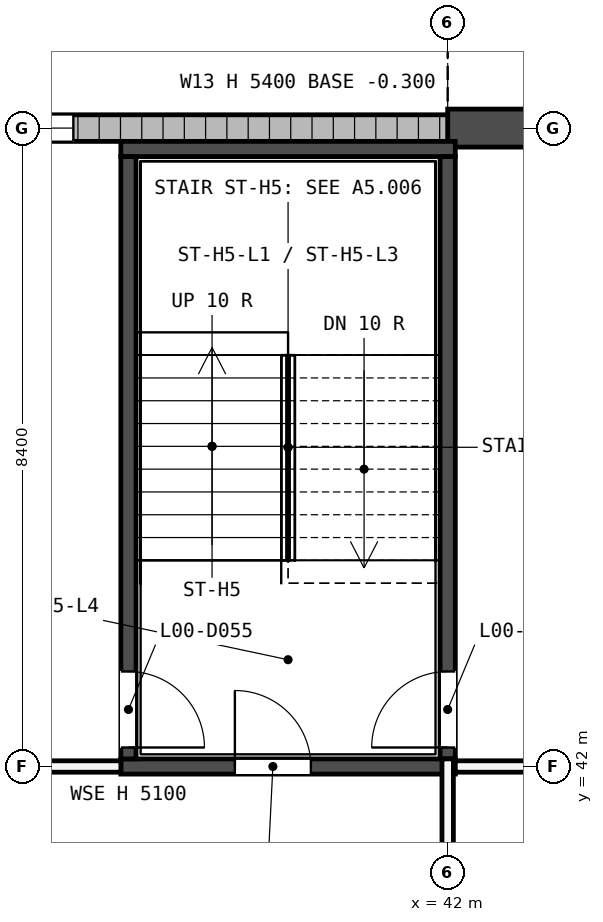
"""IFC4 building model, lengths in metres.
Left out: names, types, materials, properties, quantities, classifications, styles, units other than length and angle.
Written with IfcOpenShell. Run it as: python <this file> out.ifc"""

import sys

from ifc_helpers import new_model, si_unit, direction, frame, frame_2d, origin, place, context, subcontext, project, spatial, rectangle, extrude, element, fill, save


model = new_model("IFC4")
c1 = context("Model", 3, precision=1e-05, world=origin(), true_north=direction((0.0, 1.0)))
c2 = subcontext(c1, "Body", "Model", "MODEL_VIEW")
j1 = project(units=[si_unit("LENGTHUNIT", "METRE"), si_unit("PLANEANGLEUNIT", "RADIAN")], contexts=[c1])
p1 = place(None, origin())
s1 = spatial("IfcSite", under=j1, at=p1, CompositionType="ELEMENT")
p2 = place(p1, origin())
s2 = spatial("IfcBuilding", under=s1, at=p2, CompositionType="ELEMENT")
p3 = place(p2, origin())
s3 = spatial("IfcBuildingStorey", under=s2, at=p3, CompositionType="ELEMENT", Elevation=0.0)
p4 = place(p3, frame((42.0, 50.4, -0.3), z_axis=(0.0, 0.0, 1.0), x_axis=(1.0, 0.0, 0.0)))
e1 = element("IfcWall", 1, at=p4, inside=s3, PredefinedType="SHEAR", context=c2, shape_type="SweptSolid", body=[
    extrude(rectangle(XDim=42.0, YDim=0.5, at=frame_2d((21.0, 0.0))), origin(), (0.0, 0.0, 1.0), 5.4),
])
p5 = place(p4, frame((17.25, 0.0, 0.3)))
e2 = element("IfcOpeningElement", 2, at=p5, cuts=e1, PredefinedType="OPENING", context=c2, shape_type="SweptSolid", body=[
    extrude(rectangle(XDim=3.3, YDim=2.7, at=frame_2d((1.65, 1.35))), frame((0.0, 0.26, 0.0), z_axis=(0.0, -1.0, 0.0), x_axis=(1.0, 0.0, 0.0)), (0.0, 0.0, 1.0), 0.52),
])
p6 = place(p4, frame((21.45, 0.0, 0.3)))
e3 = element("IfcOpeningElement", 3, at=p6, cuts=e1, PredefinedType="OPENING", context=c2, shape_type="SweptSolid", body=[
    extrude(rectangle(XDim=3.3, YDim=2.7, at=frame_2d((1.65, 1.35))), frame((0.0, 0.26, 0.0), z_axis=(0.0, -1.0, 0.0), x_axis=(1.0, 0.0, 0.0)), (0.0, 0.0, 1.0), 0.52),
])
p7 = place(p3, frame((33.95, 50.4, 0.0), z_axis=(0.0, 0.0, 1.0), x_axis=(1.0, 0.0, 0.0)))
e4 = element("IfcWall", 4, at=p7, inside=s3, PredefinedType="STANDARD", context=c2, shape_type="SweptSolid", body=[
    extrude(rectangle(XDim=8.05, YDim=0.35, at=frame_2d((4.025, 0.0))), origin(), (0.0, 0.0, 1.0), 5.1),
])
p8 = place(p7, frame((0.725, 0.0, 0.9)))
e5 = element("IfcOpeningElement", 5, at=p8, cuts=e4, PredefinedType="OPENING", context=c2, shape_type="SweptSolid", body=[
    extrude(rectangle(XDim=2.4, YDim=1.5, at=frame_2d((1.2, 0.75))), frame((0.0, 0.185, 0.0), z_axis=(0.0, -1.0, 0.0), x_axis=(1.0, 0.0, 0.0)), (0.0, 0.0, 1.0), 0.37),
])
p9 = place(p3, frame((37.7, 42.0, 0.0), z_axis=(0.0, 0.0, 1.0), x_axis=(1.0, 0.0, 0.0)))
e6 = element("IfcWall", 6, at=p9, inside=s3, PredefinedType="SHEAR", context=c2, shape_type="SweptSolid", body=[
    extrude(rectangle(XDim=4.4, YDim=0.2, at=frame_2d((2.2, 0.0))), origin(), (0.0, 0.0, 1.0), 5.1),
])
p10 = place(p9, frame((1.5, 0.0, 0.0)))
e7 = element("IfcOpeningElement", 7, at=p10, cuts=e6, PredefinedType="OPENING", context=c2, shape_type="SweptSolid", body=[
    extrude(rectangle(XDim=1.0, YDim=2.1, at=frame_2d((0.5, 1.05))), frame((0.0, 0.11, 0.0), z_axis=(0.0, -1.0, 0.0), x_axis=(1.0, 0.0, 0.0)), (0.0, 0.0, 1.0), 0.22),
])
p11 = place(p3, frame((37.7, 50.125, 0.0), z_axis=(0.0, 0.0, 1.0), x_axis=(1.0, 0.0, 0.0)))
e8 = element("IfcWall", 8, at=p11, inside=s3, PredefinedType="SHEAR", context=c2, shape_type="SweptSolid", body=[
    extrude(rectangle(XDim=4.4, YDim=0.2, at=frame_2d((2.2, 0.0))), origin(), (0.0, 0.0, 1.0), 5.1),
])
p12 = place(p3, frame((37.8, 42.1, 0.0), z_axis=(0.0, 0.0, 1.0), x_axis=(0.0, 1.0, 0.0)))
e9 = element("IfcWall", 9, at=p12, inside=s3, PredefinedType="SHEAR", context=c2, shape_type="SweptSolid", body=[
    extrude(rectangle(XDim=7.925, YDim=0.2, at=frame_2d((3.962, 0.0))), origin(), (0.0, 0.0, 1.0), 5.1),
])
p13 = place(p12, frame((0.15, 0.0, 0.0)))
e10 = element("IfcOpeningElement", 10, at=p13, cuts=e9, PredefinedType="OPENING", context=c2, shape_type="SweptSolid", body=[
    extrude(rectangle(XDim=1.0, YDim=2.1, at=frame_2d((0.5, 1.05))), frame((0.0, 0.11, 0.0), z_axis=(0.0, -1.0, 0.0), x_axis=(1.0, 0.0, 0.0)), (0.0, 0.0, 1.0), 0.22),
])
p14 = place(p3, frame((42.0, 42.1, 0.0), z_axis=(0.0, 0.0, 1.0), x_axis=(0.0, 1.0, 0.0)))
e11 = element("IfcWall", 11, at=p14, inside=s3, PredefinedType="SHEAR", context=c2, shape_type="SweptSolid", body=[
    extrude(rectangle(XDim=7.925, YDim=0.2, at=frame_2d((3.962, 0.0))), origin(), (0.0, 0.0, 1.0), 5.1),
])
p15 = place(p14, frame((0.15, 0.0, 0.0)))
e12 = element("IfcOpeningElement", 12, at=p15, cuts=e11, PredefinedType="OPENING", context=c2, shape_type="SweptSolid", body=[
    extrude(rectangle(XDim=1.0, YDim=2.1, at=frame_2d((0.5, 1.05))), frame((0.0, 0.11, 0.0), z_axis=(0.0, -1.0, 0.0), x_axis=(1.0, 0.0, 0.0)), (0.0, 0.0, 1.0), 0.22),
])
p16 = place(p3, frame((25.2, 42.0, 0.0), z_axis=(0.0, 0.0, 1.0), x_axis=(1.0, 0.0, 0.0)))
e13 = element("IfcWall", 13, at=p16, inside=s3, PredefinedType="PARTITIONING", context=c2, shape_type="SweptSolid", body=[
    extrude(rectangle(XDim=12.5, YDim=0.15, at=frame_2d((6.25, 0.0))), origin(), (0.0, 0.0, 1.0), 5.1),
])
p17 = place(p16, frame((0.6, 0.0, 0.0)))
e14 = element("IfcOpeningElement", 14, at=p17, cuts=e13, PredefinedType="OPENING", context=c2, shape_type="SweptSolid", body=[
    extrude(rectangle(XDim=1.0, YDim=2.1, at=frame_2d((0.5, 1.05))), frame((0.0, 0.085, 0.0), z_axis=(0.0, -1.0, 0.0), x_axis=(1.0, 0.0, 0.0)), (0.0, 0.0, 1.0), 0.17),
])
p18 = place(p16, frame((6.9, 0.0, 0.0)))
e15 = element("IfcOpeningElement", 15, at=p18, cuts=e13, PredefinedType="OPENING", context=c2, shape_type="SweptSolid", body=[
    extrude(rectangle(XDim=1.0, YDim=2.1, at=frame_2d((0.5, 1.05))), frame((0.0, 0.085, 0.0), z_axis=(0.0, -1.0, 0.0), x_axis=(1.0, 0.0, 0.0)), (0.0, 0.0, 1.0), 0.17),
])
p19 = place(p3, frame((42.1, 42.0, 0.0), z_axis=(0.0, 0.0, 1.0), x_axis=(1.0, 0.0, 0.0)))
e16 = element("IfcWall", 16, at=p19, inside=s3, PredefinedType="PARTITIONING", context=c2, shape_type="SweptSolid", body=[
    extrude(rectangle(XDim=8.58, YDim=0.15, at=frame_2d((4.29, 0.0))), origin(), (0.0, 0.0, 1.0), 5.1),
])
p20 = place(p3, frame((42.0, 37.875, 0.0), z_axis=(0.0, 0.0, 1.0), x_axis=(0.0, 1.0, 0.0)))
e17 = element("IfcWall", 17, at=p20, inside=s3, PredefinedType="PARTITIONING", context=c2, shape_type="SweptSolid", body=[
    extrude(rectangle(XDim=4.225, YDim=0.15, at=frame_2d((2.113, 0.0))), origin(), (0.0, 0.0, 1.0), 5.1),
])
p21 = place(p20, frame((1.325, 0.0, 0.0)))
e18 = element("IfcOpeningElement", 18, at=p21, cuts=e17, PredefinedType="OPENING", context=c2, shape_type="SweptSolid", body=[
    extrude(rectangle(XDim=1.0, YDim=2.1, at=frame_2d((0.5, 1.05))), frame((0.0, 0.085, 0.0), z_axis=(0.0, -1.0, 0.0), x_axis=(1.0, 0.0, 0.0)), (0.0, 0.0, 1.0), 0.17),
])
p22 = place(p8, origin())
e19 = element("IfcWindow", 19, at=p22, inside=s3, PartitioningType="SINGLE_PANEL", PredefinedType="WINDOW", context=c2, shape_type="SweptSolid", body=[
    extrude(rectangle(XDim=2.4, YDim=1.5, at=frame_2d((1.2, 0.75))), frame((0.0, 0.03, 0.0), z_axis=(0.0, -1.0, 0.0), x_axis=(1.0, 0.0, 0.0)), (0.0, 0.0, 1.0), 0.06),
])
fill(e5, e19)
p23 = place(p15, origin())
e20 = element("IfcDoor", 20, at=p23, inside=s3, OperationType="SINGLE_SWING_RIGHT", PredefinedType="DOOR", context=c2, shape_type="SweptSolid", body=[
    extrude(rectangle(XDim=1.0, YDim=2.1, at=frame_2d((0.5, 1.05))), frame((0.0, 0.025, 0.0), z_axis=(0.0, -1.0, 0.0), x_axis=(1.0, 0.0, 0.0)), (0.0, 0.0, 1.0), 0.05),
])
fill(e12, e20)
p24 = place(p13, origin())
e21 = element("IfcDoor", 21, at=p24, inside=s3, OperationType="SINGLE_SWING_LEFT", PredefinedType="DOOR", context=c2, shape_type="SweptSolid", body=[
    extrude(rectangle(XDim=1.0, YDim=2.1, at=frame_2d((0.5, 1.05))), frame((0.0, 0.025, 0.0), z_axis=(0.0, -1.0, 0.0), x_axis=(1.0, 0.0, 0.0)), (0.0, 0.0, 1.0), 0.05),
])
fill(e10, e21)
p25 = place(p10, origin())
e22 = element("IfcDoor", 22, at=p25, inside=s3, OperationType="SINGLE_SWING_RIGHT", PredefinedType="DOOR", context=c2, shape_type="SweptSolid", body=[
    extrude(rectangle(XDim=1.0, YDim=2.1, at=frame_2d((0.5, 1.05))), frame((0.0, 0.025, 0.0), z_axis=(0.0, -1.0, 0.0), x_axis=(1.0, 0.0, 0.0)), (0.0, 0.0, 1.0), 0.05),
])
fill(e7, e22)
save(model, sys.argv[1])
